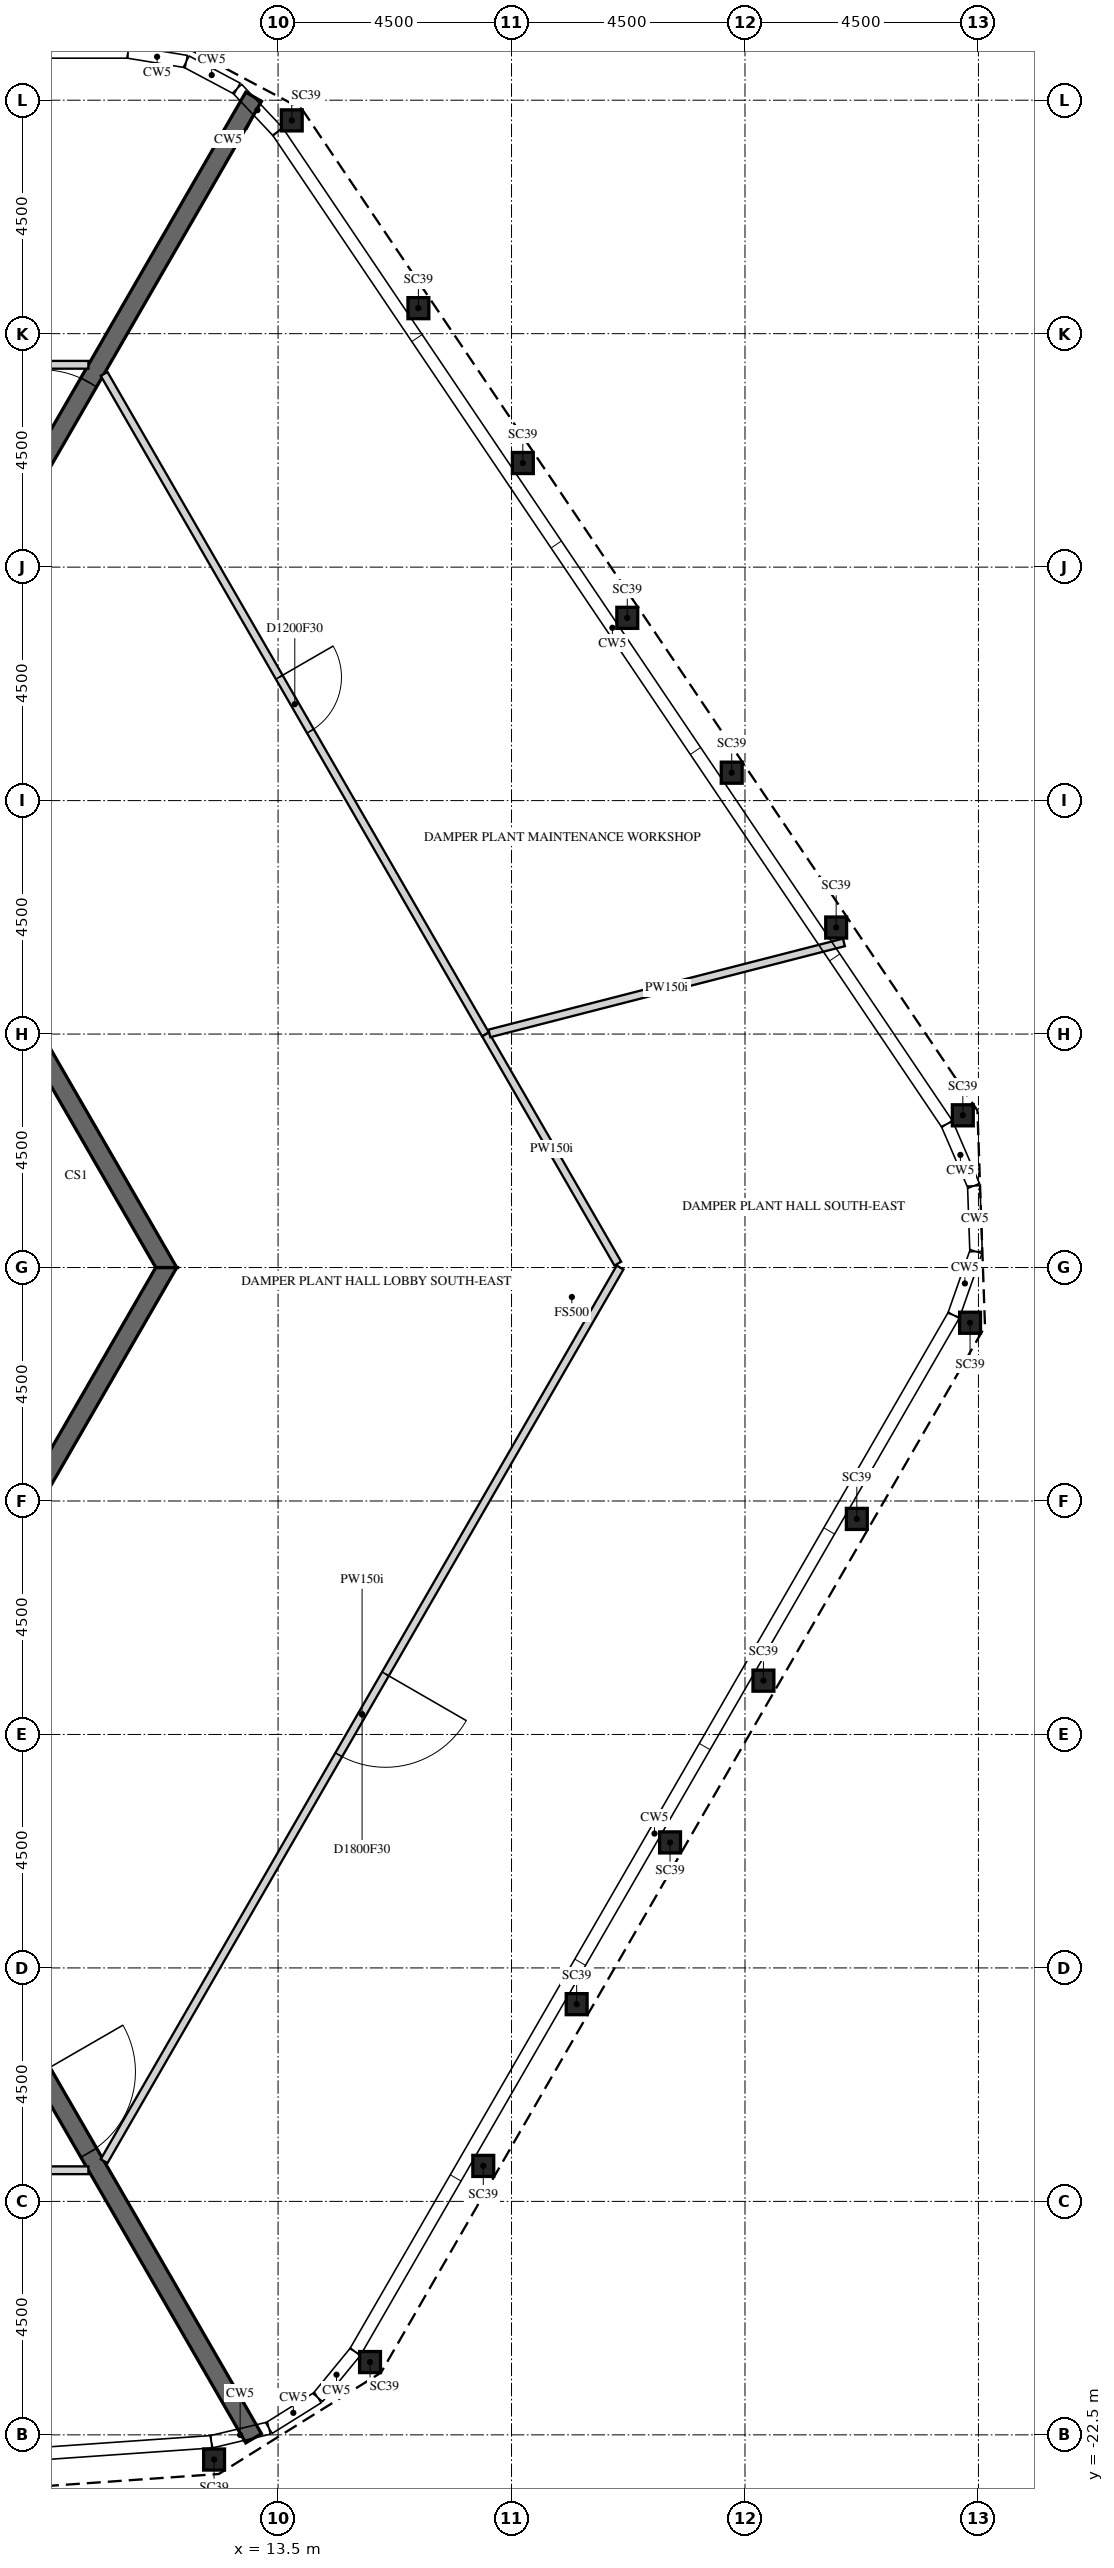
"""IFC4 building model, lengths in metres.
Left out: names, types, materials, properties, quantities, classifications, styles, units other than length and angle.
Written with IfcOpenShell. Run it as: python <this file> out.ifc"""

import sys

from ifc_helpers import new_model, si_unit, direction, frame, frame_2d, origin, origin_2d, place, context, subcontext, project, spatial, polyline, rectangle, i_section, outline, extrude, element, fill, save


model = new_model("IFC4")
c1 = context("Model", 3, precision=1e-05, world=origin(), true_north=direction((0.0, 1.0)))
c2 = subcontext(c1, "Body", "Model", "MODEL_VIEW")
j1 = project(units=[si_unit("LENGTHUNIT", "METRE"), si_unit("PLANEANGLEUNIT", "RADIAN")], contexts=[c1])
p1 = place(None, origin())
s1 = spatial("IfcSite", under=j1, at=p1, CompositionType="ELEMENT")
p2 = place(p1, origin())
s2 = spatial("IfcBuilding", under=s1, at=p2, CompositionType="ELEMENT")
p3 = place(p2, frame((0.0, 0.0, 376.8)))
s3 = spatial("IfcBuildingStorey", under=s2, at=p3, CompositionType="ELEMENT", Elevation=376.8)
for number, where, z_axis, x_axis in (
    (1, (12.267, -22.975, 0.0), (0.0, 0.0, 1.0), (1.0, 0.0, 0.0)),
    (2, (15.273, -21.097, 0.0), (0.0, 0.0, 1.0), (1.0, 0.0, 0.0)),
    (3, (17.456, -17.316, 0.0), (0.0, 0.0, 1.0), (1.0, 0.0, 0.0)),
    (4, (19.256, -14.198, 0.0), (0.0, 0.0, 1.0), (1.0, 0.0, 0.0)),
    (5, (21.056, -11.081, 0.0), (0.0, 0.0, 1.0), (1.0, 0.0, 0.0)),
    (6, (22.856, -7.963, 0.0), (0.0, 0.0, 1.0), (1.0, 0.0, 0.0)),
    (7, (24.656, -4.845, 0.0), (0.0, 0.0, 1.0), (1.0, 0.0, 0.0)),
    (8, (26.838, -1.064, 0.0), (0.0, 0.0, 1.0), (1.0, 0.0, 0.0)),
    (9, (26.699, 2.934, 0.0), (0.0, 0.0, 1.0), (1.0, 0.0, 0.0)),
    (10, (24.258, 6.553, 0.0), (0.0, 0.0, 1.0), (1.0, 0.0, 0.0)),
    (11, (22.244, 9.538, 0.0), (0.0, 0.0, 1.0), (1.0, 0.0, 0.0)),
    (12, (20.231, 12.522, 0.0), (0.0, 0.0, 1.0), (1.0, 0.0, 0.0)),
    (13, (18.218, 15.507, 0.0), (0.0, 0.0, 1.0), (1.0, 0.0, 0.0)),
    (14, (16.205, 18.492, 0.0), (0.0, 0.0, 1.0), (1.0, 0.0, 0.0)),
    (15, (13.764, 22.111, 0.0), (0.0, 0.0, 1.0), (1.0, 0.0, 0.0)),
):
    element("IfcColumn", number, at=place(p3, frame(where, z_axis=z_axis, x_axis=x_axis)), inside=s3, PredefinedType="COLUMN", context=c2, shape_type="SweptSolid", body=[
        extrude(i_section(OverallWidth=0.403, OverallDepth=0.406, WebThickness=0.027, FlangeThickness=0.043, FilletRadius=0.015, at=origin_2d()), origin(), (0.0, 0.0, 1.0), 11.2),
    ])
p4 = place(p3, frame((5.673, -9.825, -0.5), z_axis=(0.0, 0.0, 1.0), x_axis=(0.499995046907, 0.866028263435, 0.0)))
e16 = element("IfcWall", 16, at=p4, inside=s3, PredefinedType="SHEAR", context=c2, shape_type="SweptSolid", body=[
    extrude(outline(polyline([(-0.101, -0.175), (11.446, -0.175), (11.244, 0.175), (0.101, 0.175), (-0.101, -0.175)])), origin(), (0.0, 0.0, 1.0), 11.7),
])
p5 = place(p4, frame((4.801, 0.0, 0.5)))
e17 = element("IfcOpeningElement", 17, at=p5, cuts=e16, PredefinedType="OPENING", context=c2, shape_type="SweptSolid", body=[
    extrude(rectangle(XDim=1.8, YDim=2.4, at=frame_2d((0.9, 1.2))), frame((0.0, 0.185, 0.0), z_axis=(0.0, -1.0, 0.0), x_axis=(1.0, 0.0, 0.0)), (0.0, 0.0, 1.0), 0.37),
])
p6 = place(p3, frame((11.345, 0.0, -0.5), z_axis=(0.0, 0.0, 1.0), x_axis=(-0.499995046907, 0.866028263435, 0.0)))
e18 = element("IfcWall", 18, at=p6, inside=s3, PredefinedType="SHEAR", context=c2, shape_type="SweptSolid", body=[
    extrude(outline(polyline([(-0.101, -0.175), (11.446, -0.175), (11.244, 0.175), (0.101, 0.175), (-0.101, -0.175)])), origin(), (0.0, 0.0, 1.0), 11.7),
])
p7 = place(p6, frame((4.744, 0.0, 0.5)))
e19 = element("IfcOpeningElement", 19, at=p7, cuts=e18, PredefinedType="OPENING", context=c2, shape_type="SweptSolid", body=[
    extrude(rectangle(XDim=1.8, YDim=2.4, at=frame_2d((0.9, 1.2))), frame((0.0, 0.185, 0.0), z_axis=(0.0, -1.0, 0.0), x_axis=(1.0, 0.0, 0.0)), (0.0, 0.0, 1.0), 0.37),
])
p8 = place(p3, frame((5.773, 10.0, -0.5), z_axis=(0.0, 0.0, 1.0), x_axis=(0.500007911273, 0.866020836161, 0.0)))
e20 = element("IfcWall", 20, at=p8, inside=s3, PredefinedType="SHEAR", context=c2, shape_type="SweptSolid", body=[
    extrude(rectangle(XDim=14.51, YDim=0.35, at=frame_2d((7.255, 0.0))), origin(), (0.0, 0.0, 1.0), 11.7),
])
p9 = place(p8, frame((6.355, 0.0, 0.5)))
e21 = element("IfcOpeningElement", 21, at=p9, cuts=e20, PredefinedType="OPENING", context=c2, shape_type="SweptSolid", body=[
    extrude(rectangle(XDim=1.8, YDim=2.4, at=frame_2d((0.9, 1.2))), frame((0.0, 0.185, 0.0), z_axis=(0.0, -1.0, 0.0), x_axis=(1.0, 0.0, 0.0)), (0.0, 0.0, 1.0), 0.37),
])
p10 = place(p3, frame((5.773, -10.0, -0.5), z_axis=(0.0, 0.0, 1.0), x_axis=(0.500007911273, -0.866020836161, 0.0)))
e22 = element("IfcWall", 22, at=p10, inside=s3, PredefinedType="SHEAR", context=c2, shape_type="SweptSolid", body=[
    extrude(rectangle(XDim=14.51, YDim=0.35, at=frame_2d((7.255, 0.0))), origin(), (0.0, 0.0, 1.0), 11.7),
])
p11 = place(p10, frame((6.355, 0.0, 0.5)))
e23 = element("IfcOpeningElement", 23, at=p11, cuts=e22, PredefinedType="OPENING", context=c2, shape_type="SweptSolid", body=[
    extrude(rectangle(XDim=1.8, YDim=2.4, at=frame_2d((0.9, 1.2))), frame((0.0, 0.185, 0.0), z_axis=(0.0, -1.0, 0.0), x_axis=(1.0, 0.0, 0.0)), (0.0, 0.0, 1.0), 0.37),
])
p12 = place(p3, frame((9.844, -17.4, 0.0), z_axis=(0.0, 0.0, 1.0), x_axis=(-1.0, 0.0, 0.0)))
e24 = element("IfcWall", 24, at=p12, inside=s3, PredefinedType="PARTITIONING", context=c2, shape_type="SweptSolid", body=[
    extrude(rectangle(XDim=11.598, YDim=0.15, at=frame_2d((5.799, 0.0))), origin(), (0.0, 0.0, 1.0), 11.2),
])
p13 = place(p12, frame((5.299, 0.0, 0.0)))
e25 = element("IfcOpeningElement", 25, at=p13, cuts=e24, PredefinedType="OPENING", context=c2, shape_type="SweptSolid", body=[
    extrude(rectangle(XDim=1.0, YDim=2.1, at=frame_2d((0.5, 1.05))), frame((0.0, 0.085, 0.0), z_axis=(0.0, -1.0, 0.0), x_axis=(1.0, 0.0, 0.0)), (0.0, 0.0, 1.0), 0.17),
])
p14 = place(p3, frame((9.844, 17.4, 0.0), z_axis=(0.0, 0.0, 1.0), x_axis=(-1.0, 0.0, 0.0)))
e26 = element("IfcWall", 26, at=p14, inside=s3, PredefinedType="PARTITIONING", context=c2, shape_type="SweptSolid", body=[
    extrude(rectangle(XDim=19.803, YDim=0.15, at=frame_2d((9.902, 0.0))), origin(), (0.0, 0.0, 1.0), 11.2),
])
p15 = place(p3, frame((20.092, 0.0, 0.0), z_axis=(0.0, 0.0, 1.0), x_axis=(-0.500005791521, -0.866022060022, 0.0)))
e27 = element("IfcWall", 27, at=p15, inside=s3, PredefinedType="PARTITIONING", context=c2, shape_type="SweptSolid", body=[
    extrude(rectangle(XDim=19.89, YDim=0.15, at=frame_2d((9.945, 0.0))), origin(), (0.0, 0.0, 1.0), 11.2),
])
p16 = place(p15, frame((9.045, 0.0, 0.0)))
e28 = element("IfcOpeningElement", 28, at=p16, cuts=e27, PredefinedType="OPENING", context=c2, shape_type="SweptSolid", body=[
    extrude(rectangle(XDim=1.8, YDim=2.1, at=frame_2d((0.9, 1.05))), frame((0.0, 0.085, 0.0), z_axis=(0.0, -1.0, 0.0), x_axis=(1.0, 0.0, 0.0)), (0.0, 0.0, 1.0), 0.17),
])
p17 = place(p3, frame((10.147, 17.225, 0.0), z_axis=(0.0, 0.0, 1.0), x_axis=(0.50000754881, -0.866021045433, 0.0)))
e29 = element("IfcWall", 29, at=p17, inside=s3, PredefinedType="PARTITIONING", context=c2, shape_type="SweptSolid", body=[
    extrude(rectangle(XDim=14.702, YDim=0.15, at=frame_2d((7.351, 0.0))), origin(), (0.0, 0.0, 1.0), 11.2),
])
p18 = place(p17, frame((6.751, 0.0, 0.0)))
e30 = element("IfcOpeningElement", 30, at=p18, cuts=e29, PredefinedType="OPENING", context=c2, shape_type="SweptSolid", body=[
    extrude(rectangle(XDim=1.2, YDim=2.1, at=frame_2d((0.6, 1.05))), frame((0.0, 0.085, 0.0), z_axis=(0.0, -1.0, 0.0), x_axis=(1.0, 0.0, 0.0)), (0.0, 0.0, 1.0), 0.17),
])
p19 = place(p3, frame((20.049, 0.075, 0.0), z_axis=(0.0, 0.0, 1.0), x_axis=(-0.499973780535, 0.86604054107, 0.0)))
e31 = element("IfcWall", 31, at=p19, inside=s3, PredefinedType="PARTITIONING", context=c2, shape_type="SweptSolid", body=[
    extrude(rectangle(XDim=5.101, YDim=0.15, at=frame_2d((2.551, 0.0))), origin(), (0.0, 0.0, 1.0), 11.2),
])
p20 = place(p3, frame((24.407, 6.267, 0.0), z_axis=(0.0, 0.0, 1.0), x_axis=(-0.96858611001, -0.248678401748, 0.0)))
e32 = element("IfcWall", 32, at=p20, inside=s3, PredefinedType="PARTITIONING", context=c2, shape_type="SweptSolid", body=[
    extrude(rectangle(XDim=7.055, YDim=0.15, at=frame_2d((3.527, 0.0))), origin(), (0.0, 0.0, 1.0), 11.2),
])
p21 = place(p9, origin())
e33 = element("IfcDoor", 33, at=p21, inside=s3, OperationType="DOUBLE_DOOR_SINGLE_SWING", PredefinedType="DOOR", context=c2, shape_type="SweptSolid", body=[
    extrude(rectangle(XDim=1.8, YDim=2.4, at=frame_2d((0.9, 1.2))), frame((0.0, 0.025, 0.0), z_axis=(0.0, -1.0, 0.0), x_axis=(1.0, 0.0, 0.0)), (0.0, 0.0, 1.0), 0.05),
])
fill(e21, e33)
p22 = place(p11, origin())
e34 = element("IfcDoor", 34, at=p22, inside=s3, OperationType="DOUBLE_DOOR_SINGLE_SWING", PredefinedType="DOOR", context=c2, shape_type="SweptSolid", body=[
    extrude(rectangle(XDim=1.8, YDim=2.4, at=frame_2d((0.9, 1.2))), frame((0.0, 0.025, 0.0), z_axis=(0.0, -1.0, 0.0), x_axis=(1.0, 0.0, 0.0)), (0.0, 0.0, 1.0), 0.05),
])
fill(e23, e34)
p23 = place(p16, origin())
e35 = element("IfcDoor", 35, at=p23, inside=s3, OperationType="DOUBLE_DOOR_SINGLE_SWING", PredefinedType="DOOR", context=c2, shape_type="SweptSolid", body=[
    extrude(rectangle(XDim=1.8, YDim=2.1, at=frame_2d((0.9, 1.05))), frame((0.0, 0.025, 0.0), z_axis=(0.0, -1.0, 0.0), x_axis=(1.0, 0.0, 0.0)), (0.0, 0.0, 1.0), 0.05),
])
fill(e28, e35)
p24 = place(p18, origin())
e36 = element("IfcDoor", 36, at=p24, inside=s3, OperationType="SINGLE_SWING_RIGHT", PredefinedType="DOOR", context=c2, shape_type="SweptSolid", body=[
    extrude(rectangle(XDim=1.2, YDim=2.1, at=frame_2d((0.6, 1.05))), frame((0.0, 0.025, 0.0), z_axis=(0.0, -1.0, 0.0), x_axis=(1.0, 0.0, 0.0)), (0.0, 0.0, 1.0), 0.05),
])
fill(e30, e36)
save(model, sys.argv[1])
